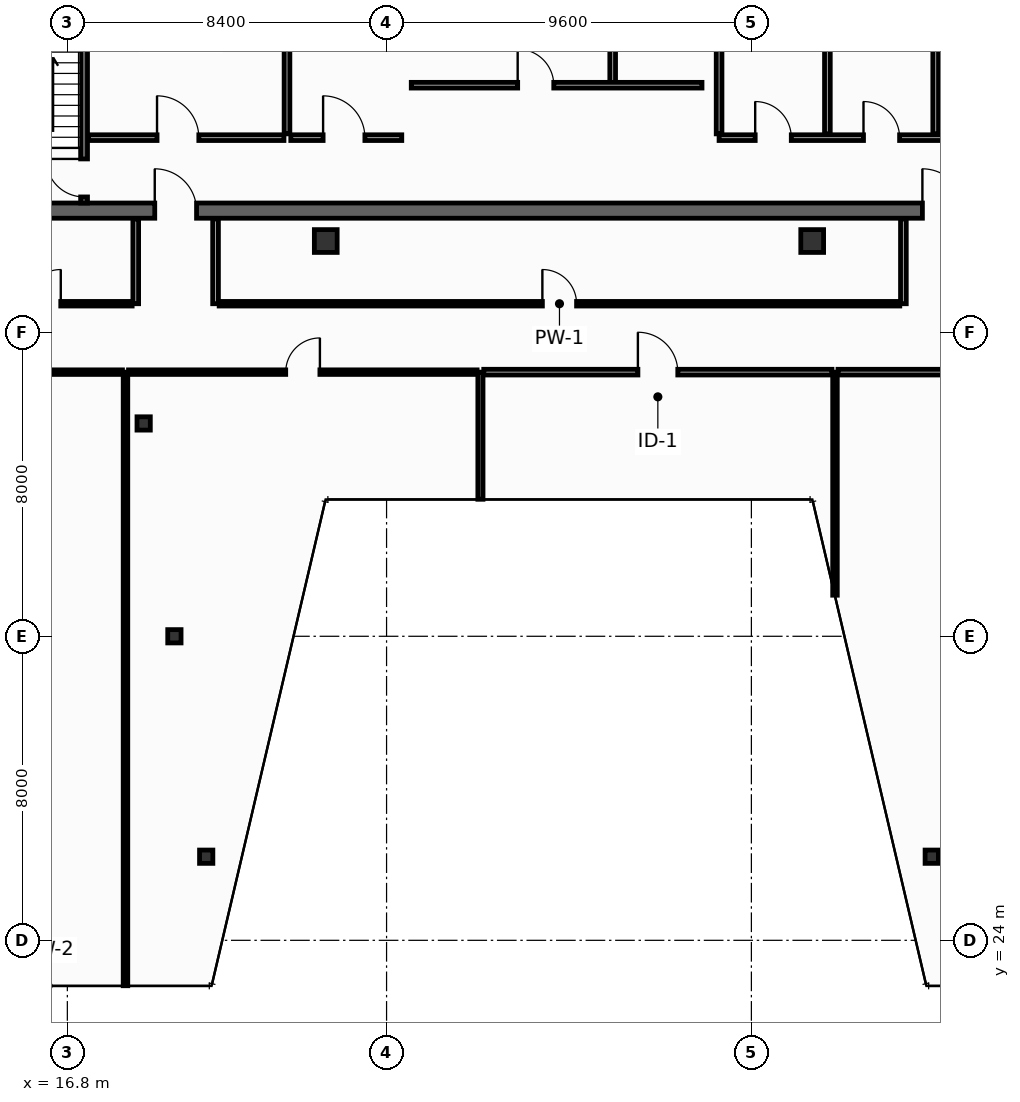
"""IFC4 building model, lengths in metres.
Left out: names, types, materials, properties, quantities, classifications, styles, units other than length and angle.
Written with IfcOpenShell. Run it as: python <this file> out.ifc"""

import sys

from ifc_helpers import new_model, si_unit, direction, frame, frame_2d, origin, origin_2d, place, context, subcontext, project, spatial, rectangle, hollow_rectangle, extrude, element, fill, save


model = new_model("IFC4")
c1 = context("Model", 3, precision=1e-05, world=origin(), true_north=direction((0.0, 1.0)))
c2 = subcontext(c1, "Body", "Model", "MODEL_VIEW")
j1 = project(units=[si_unit("LENGTHUNIT", "METRE"), si_unit("PLANEANGLEUNIT", "RADIAN")], contexts=[c1])
p1 = place(None, origin())
s1 = spatial("IfcSite", under=j1, at=p1, CompositionType="ELEMENT")
p2 = place(p1, origin())
s2 = spatial("IfcBuilding", under=s1, at=p2, CompositionType="ELEMENT")
p3 = place(p2, frame((0.0, 0.0, 268.6)))
s3 = spatial("IfcBuildingStorey", under=s2, at=p3, CompositionType="ELEMENT", Elevation=268.6)
p4 = place(p3, frame((13.7, 43.2, 0.0), z_axis=(0.0, 0.0, 1.0), x_axis=(1.0, 0.0, 0.0)))
e1 = element("IfcWall", 1, at=p4, inside=s3, PredefinedType="SHEAR", context=c2, shape_type="SweptSolid", body=[
    extrude(rectangle(XDim=32.5, YDim=0.4, at=frame_2d((16.25, 0.0))), origin(), (0.0, 0.0, 1.0), 3.55),
])
p5 = place(p4, frame((5.4, 0.0, 0.0)))
e2 = element("IfcOpeningElement", 2, at=p5, cuts=e1, PredefinedType="OPENING", context=c2, shape_type="SweptSolid", body=[
    extrude(rectangle(XDim=1.1, YDim=2.15, at=frame_2d((0.55, 1.075))), frame((0.0, 0.21, 0.0), z_axis=(0.0, -1.0, 0.0), x_axis=(1.0, 0.0, 0.0)), (0.0, 0.0, 1.0), 0.42),
])
p6 = place(p4, frame((25.6, 0.0, 0.0)))
e3 = element("IfcOpeningElement", 3, at=p6, cuts=e1, PredefinedType="OPENING", context=c2, shape_type="SweptSolid", body=[
    extrude(rectangle(XDim=1.1, YDim=2.15, at=frame_2d((0.55, 1.075))), frame((0.0, 0.21, 0.0), z_axis=(0.0, -1.0, 0.0), x_axis=(1.0, 0.0, 0.0)), (0.0, 0.0, 1.0), 0.42),
])
for number, where, z_axis, x_axis in (
    (4, (23.6, 42.4, 0.0), (0.0, 0.0, 1.0), (1.0, 0.0, 0.0)),
    (5, (36.4, 42.4, 0.0), (0.0, 0.0, 1.0), (1.0, 0.0, 0.0)),
):
    element("IfcColumn", number, at=place(p3, frame(where, z_axis=z_axis, x_axis=x_axis)), inside=s3, PredefinedType="COLUMN", context=c2, shape_type="SweptSolid", body=[
        extrude(hollow_rectangle(XDim=0.6, YDim=0.6, WallThickness=0.028, at=origin_2d()), origin(), (0.0, 0.0, 1.0), 3.8),
    ])
for number, where, z_axis, x_axis in (
    (6, (20.454, 26.2, 0.0), (0.0, 0.0, 1.0), (1.0, 0.0, 0.0)),
    (7, (39.546, 26.2, 0.0), (0.0, 0.0, 1.0), (1.0, 0.0, 0.0)),
    (8, (19.617, 32.0, 0.0), (0.0, 0.0, 1.0), (1.0, 0.0, 0.0)),
    (9, (18.808, 37.6, 0.0), (0.0, 0.0, 1.0), (1.0, 0.0, 0.0)),
):
    element("IfcColumn", number, at=place(p3, frame(where, z_axis=z_axis, x_axis=x_axis)), inside=s3, PredefinedType="COLUMN", context=c2, shape_type="SweptSolid", body=[
        extrude(hollow_rectangle(XDim=0.35, YDim=0.35, WallThickness=0.016, at=origin_2d()), origin(), (0.0, 0.0, 1.0), 3.8),
    ])
p7 = place(p3, frame((17.24, 43.4, 0.0), z_axis=(0.0, 0.0, 1.0), x_axis=(0.0, 1.0, 0.0)))
e10 = element("IfcWall", 10, at=p7, inside=s3, PredefinedType="SHEAR", context=c2, shape_type="SweptSolid", body=[
    extrude(rectangle(XDim=10.4, YDim=0.18, at=frame_2d((5.2, 0.0))), origin(), (0.0, 0.0, 1.0), 3.55),
])
p8 = place(p7, frame((0.16, 0.0, 0.0)))
e11 = element("IfcOpeningElement", 11, at=p8, cuts=e10, PredefinedType="OPENING", context=c2, shape_type="SweptSolid", body=[
    extrude(rectangle(XDim=1.0, YDim=2.15, at=frame_2d((0.5, 1.075))), frame((0.0, 0.1, 0.0), z_axis=(0.0, -1.0, 0.0), x_axis=(1.0, 0.0, 0.0)), (0.0, 0.0, 1.0), 0.2),
])
p9 = place(p3, frame((17.36, 45.12, 0.0), z_axis=(0.0, 0.0, 1.0), x_axis=(1.0, 0.0, 0.0)))
e12 = element("IfcWall", 12, at=p9, inside=s3, PredefinedType="PARTITIONING", context=c2, shape_type="SweptSolid", body=[
    extrude(rectangle(XDim=5.14, YDim=0.15, at=frame_2d((2.57, 0.0))), origin(), (0.0, 0.0, 1.0), 3.55),
])
p10 = place(p9, frame((1.8, 0.0, 0.0)))
e13 = element("IfcOpeningElement", 13, at=p10, cuts=e12, PredefinedType="OPENING", context=c2, shape_type="SweptSolid", body=[
    extrude(rectangle(XDim=1.1, YDim=2.15, at=frame_2d((0.55, 1.075))), frame((0.0, 0.085, 0.0), z_axis=(0.0, -1.0, 0.0), x_axis=(1.0, 0.0, 0.0)), (0.0, 0.0, 1.0), 0.17),
])
p11 = place(p3, frame((22.58, 50.55, 0.0), z_axis=(0.0, 0.0, 1.0), x_axis=(0.0, -1.0, 0.0)))
e14 = element("IfcWall", 14, at=p11, inside=s3, PredefinedType="PARTITIONING", context=c2, shape_type="SweptSolid", body=[
    extrude(rectangle(XDim=5.33, YDim=0.15, at=frame_2d((2.665, 0.0))), origin(), (0.0, 0.0, 1.0), 3.55),
])
p12 = place(p11, frame((1.8, 0.0, 0.0)))
e15 = element("IfcOpeningElement", 15, at=p12, cuts=e14, PredefinedType="OPENING", context=c2, shape_type="SweptSolid", body=[
    extrude(rectangle(XDim=1.1, YDim=2.15, at=frame_2d((0.55, 1.075))), frame((0.0, 0.085, 0.0), z_axis=(0.0, -1.0, 0.0), x_axis=(1.0, 0.0, 0.0)), (0.0, 0.0, 1.0), 0.17),
])
p13 = place(p3, frame((22.68, 45.12, 0.0), z_axis=(0.0, 0.0, 1.0), x_axis=(1.0, 0.0, 0.0)))
e16 = element("IfcWall", 16, at=p13, inside=s3, PredefinedType="PARTITIONING", context=c2, shape_type="SweptSolid", body=[
    extrude(rectangle(XDim=2.92, YDim=0.15, at=frame_2d((1.46, 0.0))), origin(), (0.0, 0.0, 1.0), 3.55),
])
p14 = place(p13, frame((0.85, 0.0, 0.0)))
e17 = element("IfcOpeningElement", 17, at=p14, cuts=e16, PredefinedType="OPENING", context=c2, shape_type="SweptSolid", body=[
    extrude(rectangle(XDim=1.1, YDim=2.15, at=frame_2d((0.55, 1.075))), frame((0.0, 0.085, 0.0), z_axis=(0.0, -1.0, 0.0), x_axis=(1.0, 0.0, 0.0)), (0.0, 0.0, 1.0), 0.17),
])
p15 = place(p3, frame((31.15, 46.5, 0.0), z_axis=(0.0, 0.0, 1.0), x_axis=(0.0, 1.0, 0.0)))
e18 = element("IfcWall", 18, at=p15, inside=s3, PredefinedType="PARTITIONING", context=c2, shape_type="SweptSolid", body=[
    extrude(rectangle(XDim=4.35, YDim=0.15, at=frame_2d((2.175, 0.0))), origin(), (0.0, 0.0, 1.0), 3.55),
])
p16 = place(p15, frame((1.5, 0.0, 0.0)))
e19 = element("IfcOpeningElement", 19, at=p16, cuts=e18, PredefinedType="OPENING", context=c2, shape_type="SweptSolid", body=[
    extrude(rectangle(XDim=1.05, YDim=2.15, at=frame_2d((0.525, 1.075))), frame((0.0, 0.085, 0.0), z_axis=(0.0, -1.0, 0.0), x_axis=(1.0, 0.0, 0.0)), (0.0, 0.0, 1.0), 0.17),
])
p17 = place(p3, frame((33.95, 45.12, 0.0), z_axis=(0.0, 0.0, 1.0), x_axis=(1.0, 0.0, 0.0)))
e20 = element("IfcWall", 20, at=p17, inside=s3, PredefinedType="PARTITIONING", context=c2, shape_type="SweptSolid", body=[
    extrude(rectangle(XDim=8.55, YDim=0.15, at=frame_2d((4.275, 0.0))), origin(), (0.0, 0.0, 1.0), 3.55),
])
p18 = place(p17, frame((0.95, 0.0, 0.0)))
e21 = element("IfcOpeningElement", 21, at=p18, cuts=e20, PredefinedType="OPENING", context=c2, shape_type="SweptSolid", body=[
    extrude(rectangle(XDim=0.95, YDim=2.15, at=frame_2d((0.475, 1.075))), frame((0.0, 0.085, 0.0), z_axis=(0.0, -1.0, 0.0), x_axis=(1.0, 0.0, 0.0)), (0.0, 0.0, 1.0), 0.17),
])
p19 = place(p17, frame((3.8, 0.0, 0.0)))
e22 = element("IfcOpeningElement", 22, at=p19, cuts=e20, PredefinedType="OPENING", context=c2, shape_type="SweptSolid", body=[
    extrude(rectangle(XDim=0.95, YDim=2.15, at=frame_2d((0.475, 1.075))), frame((0.0, 0.085, 0.0), z_axis=(0.0, -1.0, 0.0), x_axis=(1.0, 0.0, 0.0)), (0.0, 0.0, 1.0), 0.17),
])
p20 = place(p17, frame((6.65, 0.0, 0.0)))
e23 = element("IfcOpeningElement", 23, at=p20, cuts=e20, PredefinedType="OPENING", context=c2, shape_type="SweptSolid", body=[
    extrude(rectangle(XDim=0.95, YDim=2.15, at=frame_2d((0.475, 1.075))), frame((0.0, 0.085, 0.0), z_axis=(0.0, -1.0, 0.0), x_axis=(1.0, 0.0, 0.0)), (0.0, 0.0, 1.0), 0.17),
])
for number, where, z_axis, x_axis in (
    (24, (33.95, 45.22, 0.0), (0.0, 0.0, 1.0), (0.0, 1.0, 0.0)),
    (25, (36.8, 45.22, 0.0), (0.0, 0.0, 1.0), (0.0, 1.0, 0.0)),
    (26, (39.65, 45.22, 0.0), (0.0, 0.0, 1.0), (0.0, 1.0, 0.0)),
):
    element("IfcWall", number, at=place(p3, frame(where, z_axis=z_axis, x_axis=x_axis)), inside=s3, PredefinedType="PARTITIONING", context=c2, shape_type="SweptSolid", body=[
        extrude(rectangle(XDim=2.33, YDim=0.15, at=frame_2d((1.165, 0.0))), origin(), (0.0, 0.0, 1.0), 3.55),
    ])
p21 = place(p3, frame((25.85, 46.5, 0.0), z_axis=(0.0, 0.0, 1.0), x_axis=(1.0, 0.0, 0.0)))
e27 = element("IfcWall", 27, at=p21, inside=s3, PredefinedType="PARTITIONING", context=c2, shape_type="SweptSolid", body=[
    extrude(rectangle(XDim=7.65, YDim=0.15, at=frame_2d((3.825, 0.0))), origin(), (0.0, 0.0, 1.0), 3.55),
])
p22 = place(p21, frame((2.8, 0.0, 0.0)))
e28 = element("IfcOpeningElement", 28, at=p22, cuts=e27, PredefinedType="OPENING", context=c2, shape_type="SweptSolid", body=[
    extrude(rectangle(XDim=0.95, YDim=2.15, at=frame_2d((0.475, 1.075))), frame((0.0, 0.085, 0.0), z_axis=(0.0, -1.0, 0.0), x_axis=(1.0, 0.0, 0.0)), (0.0, 0.0, 1.0), 0.17),
])
for number, where, z_axis, x_axis in (
    (29, (18.6, 40.75, 0.0), (0.0, 0.0, 1.0), (0.0, 1.0, 0.0)),
    (30, (20.7, 40.75, 0.0), (0.0, 0.0, 1.0), (0.0, 1.0, 0.0)),
    (31, (38.8, 40.75, 0.0), (0.0, 0.0, 1.0), (0.0, 1.0, 0.0)),
):
    element("IfcWall", number, at=place(p3, frame(where, z_axis=z_axis, x_axis=x_axis)), inside=s3, PredefinedType="PARTITIONING", context=c2, shape_type="SweptSolid", body=[
        extrude(rectangle(XDim=2.23, YDim=0.15, at=frame_2d((1.115, 0.0))), origin(), (0.0, 0.0, 1.0), 3.55),
    ])
p23 = place(p3, frame((13.85, 40.75, 0.0), z_axis=(0.0, 0.0, 1.0), x_axis=(1.0, 0.0, 0.0)))
e32 = element("IfcWall", 32, at=p23, inside=s3, PredefinedType="PARTITIONING", context=c2, shape_type="SweptSolid", body=[
    extrude(rectangle(XDim=4.655, YDim=0.12, at=frame_2d((2.327, 0.0))), origin(), (0.0, 0.0, 1.0), 3.55),
])
p24 = place(p23, frame((1.877, 0.0, 0.0)))
e33 = element("IfcOpeningElement", 33, at=p24, cuts=e32, PredefinedType="OPENING", context=c2, shape_type="SweptSolid", body=[
    extrude(rectangle(XDim=0.9, YDim=2.1, at=frame_2d((0.45, 1.05))), frame((0.0, 0.07, 0.0), z_axis=(0.0, -1.0, 0.0), x_axis=(1.0, 0.0, 0.0)), (0.0, 0.0, 1.0), 0.14),
])
p25 = place(p3, frame((20.795, 40.75, 0.0), z_axis=(0.0, 0.0, 1.0), x_axis=(1.0, 0.0, 0.0)))
e34 = element("IfcWall", 34, at=p25, inside=s3, PredefinedType="PARTITIONING", context=c2, shape_type="SweptSolid", body=[
    extrude(rectangle(XDim=17.91, YDim=0.12, at=frame_2d((8.955, 0.0))), origin(), (0.0, 0.0, 1.0), 2.947),
])
p26 = place(p25, frame((8.505, 0.0, 0.0)))
e35 = element("IfcOpeningElement", 35, at=p26, cuts=e34, PredefinedType="OPENING", context=c2, shape_type="SweptSolid", body=[
    extrude(rectangle(XDim=0.9, YDim=2.1, at=frame_2d((0.45, 1.05))), frame((0.0, 0.07, 0.0), z_axis=(0.0, -1.0, 0.0), x_axis=(1.0, 0.0, 0.0)), (0.0, 0.0, 1.0), 0.14),
])
p27 = place(p3, frame((18.33, 22.805, 0.0), z_axis=(0.0, 0.0, 1.0), x_axis=(0.0, 1.0, 0.0)))
e36 = element("IfcWall", 36, at=p27, inside=s3, PredefinedType="PARTITIONING", context=c2, shape_type="SweptSolid", body=[
    extrude(rectangle(XDim=16.145, YDim=0.12, at=frame_2d((8.073, 0.0))), origin(), (0.0, 0.0, 1.0), 2.947),
])
p28 = place(p3, frame((27.67, 35.605, 0.0), z_axis=(0.0, 0.0, 1.0), x_axis=(0.0, 1.0, 0.0)))
e37 = element("IfcWall", 37, at=p28, inside=s3, PredefinedType="PARTITIONING", context=c2, shape_type="SweptSolid", body=[
    extrude(rectangle(XDim=3.345, YDim=0.135, at=frame_2d((1.672, 0.0))), origin(), (0.0, 0.0, 1.0), 3.55),
])
p29 = place(p3, frame((37.0, 33.081, 0.0), z_axis=(0.0, 0.0, 1.0), x_axis=(0.0, 1.0, 0.0)))
e38 = element("IfcWall", 38, at=p29, inside=s3, PredefinedType="PARTITIONING", context=c2, shape_type="SweptSolid", body=[
    extrude(rectangle(XDim=5.869, YDim=0.12, at=frame_2d((2.935, 0.0))), origin(), (0.0, 0.0, 1.0), 3.55),
])
p30 = place(p3, frame((6.483, 38.95, 0.0), z_axis=(0.0, 0.0, 1.0), x_axis=(1.0, 0.0, 0.0)))
e39 = element("IfcWall", 39, at=p30, inside=s3, PredefinedType="PARTITIONING", context=c2, shape_type="SweptSolid", body=[
    extrude(rectangle(XDim=11.767, YDim=0.12, at=frame_2d((5.883, 0.0))), origin(), (0.0, 0.0, 1.0), 3.085),
])
p31 = place(p30, frame((5.433, 0.0, 0.0)))
e40 = element("IfcOpeningElement", 40, at=p31, cuts=e39, PredefinedType="OPENING", context=c2, shape_type="SweptSolid", body=[
    extrude(rectangle(XDim=0.9, YDim=2.1, at=frame_2d((0.45, 1.05))), frame((0.0, 0.07, 0.0), z_axis=(0.0, -1.0, 0.0), x_axis=(1.0, 0.0, 0.0)), (0.0, 0.0, 1.0), 0.14),
])
p32 = place(p3, frame((18.41, 38.95, 0.0), z_axis=(0.0, 0.0, 1.0), x_axis=(1.0, 0.0, 0.0)))
e41 = element("IfcWall", 41, at=p32, inside=s3, PredefinedType="PARTITIONING", context=c2, shape_type="SweptSolid", body=[
    extrude(rectangle(XDim=9.173, YDim=0.12, at=frame_2d((4.586, 0.0))), origin(), (0.0, 0.0, 1.0), 2.947),
])
p33 = place(p32, frame((4.136, 0.0, 0.0)))
e42 = element("IfcOpeningElement", 42, at=p33, cuts=e41, PredefinedType="OPENING", context=c2, shape_type="SweptSolid", body=[
    extrude(rectangle(XDim=0.9, YDim=2.1, at=frame_2d((0.45, 1.05))), frame((0.0, 0.07, 0.0), z_axis=(0.0, -1.0, 0.0), x_axis=(1.0, 0.0, 0.0)), (0.0, 0.0, 1.0), 0.14),
])
p34 = place(p3, frame((27.758, 38.95, 0.0), z_axis=(0.0, 0.0, 1.0), x_axis=(1.0, 0.0, 0.0)))
e43 = element("IfcWall", 43, at=p34, inside=s3, PredefinedType="PARTITIONING", context=c2, shape_type="SweptSolid", body=[
    extrude(rectangle(XDim=9.162, YDim=0.15, at=frame_2d((4.581, 0.0))), origin(), (0.0, 0.0, 1.0), 3.55),
])
p35 = place(p34, frame((4.056, 0.0, 0.0)))
e44 = element("IfcOpeningElement", 44, at=p35, cuts=e43, PredefinedType="OPENING", context=c2, shape_type="SweptSolid", body=[
    extrude(rectangle(XDim=1.05, YDim=2.15, at=frame_2d((0.525, 1.075))), frame((0.0, 0.085, 0.0), z_axis=(0.0, -1.0, 0.0), x_axis=(1.0, 0.0, 0.0)), (0.0, 0.0, 1.0), 0.17),
])
p36 = place(p3, frame((37.08, 38.95, 0.0), z_axis=(0.0, 0.0, 1.0), x_axis=(1.0, 0.0, 0.0)))
e45 = element("IfcWall", 45, at=p36, inside=s3, PredefinedType="PARTITIONING", context=c2, shape_type="SweptSolid", body=[
    extrude(rectangle(XDim=9.172, YDim=0.15, at=frame_2d((4.586, 0.0))), origin(), (0.0, 0.0, 1.0), 2.947),
])
p37 = place(p36, frame((4.501, 0.0, 0.0)))
e46 = element("IfcOpeningElement", 46, at=p37, cuts=e45, PredefinedType="OPENING", context=c2, shape_type="SweptSolid", body=[
    extrude(rectangle(XDim=1.05, YDim=2.15, at=frame_2d((0.525, 1.075))), frame((0.0, 0.085, 0.0), z_axis=(0.0, -1.0, 0.0), x_axis=(1.0, 0.0, 0.0)), (0.0, 0.0, 1.0), 0.17),
])
p38 = place(p8, origin())
e47 = element("IfcDoor", 47, at=p38, inside=s3, OperationType="SINGLE_SWING_RIGHT", PredefinedType="DOOR", context=c2, shape_type="SweptSolid", body=[
    extrude(rectangle(XDim=1.0, YDim=2.15, at=frame_2d((0.5, 1.075))), frame((0.0, 0.025, 0.0), z_axis=(0.0, -1.0, 0.0), x_axis=(1.0, 0.0, 0.0)), (0.0, 0.0, 1.0), 0.05),
])
fill(e11, e47)
p39 = place(p10, origin())
e48 = element("IfcDoor", 48, at=p39, inside=s3, OperationType="SINGLE_SWING_LEFT", PredefinedType="DOOR", context=c2, shape_type="SweptSolid", body=[
    extrude(rectangle(XDim=1.1, YDim=2.15, at=frame_2d((0.55, 1.075))), frame((0.0, 0.025, 0.0), z_axis=(0.0, -1.0, 0.0), x_axis=(1.0, 0.0, 0.0)), (0.0, 0.0, 1.0), 0.05),
])
fill(e13, e48)
p40 = place(p14, origin())
e49 = element("IfcDoor", 49, at=p40, inside=s3, OperationType="SINGLE_SWING_LEFT", PredefinedType="DOOR", context=c2, shape_type="SweptSolid", body=[
    extrude(rectangle(XDim=1.1, YDim=2.15, at=frame_2d((0.55, 1.075))), frame((0.0, 0.025, 0.0), z_axis=(0.0, -1.0, 0.0), x_axis=(1.0, 0.0, 0.0)), (0.0, 0.0, 1.0), 0.05),
])
fill(e17, e49)
p41 = place(p5, origin())
e50 = element("IfcDoor", 50, at=p41, inside=s3, OperationType="SINGLE_SWING_LEFT", PredefinedType="DOOR", context=c2, shape_type="SweptSolid", body=[
    extrude(rectangle(XDim=1.1, YDim=2.15, at=frame_2d((0.55, 1.075))), frame((0.0, 0.025, 0.0), z_axis=(0.0, -1.0, 0.0), x_axis=(1.0, 0.0, 0.0)), (0.0, 0.0, 1.0), 0.05),
])
fill(e2, e50)
p42 = place(p6, origin())
e51 = element("IfcDoor", 51, at=p42, inside=s3, OperationType="SINGLE_SWING_LEFT", PredefinedType="DOOR", context=c2, shape_type="SweptSolid", body=[
    extrude(rectangle(XDim=1.1, YDim=2.15, at=frame_2d((0.55, 1.075))), frame((0.0, 0.025, 0.0), z_axis=(0.0, -1.0, 0.0), x_axis=(1.0, 0.0, 0.0)), (0.0, 0.0, 1.0), 0.05),
])
fill(e3, e51)
p43 = place(p18, origin())
e52 = element("IfcDoor", 52, at=p43, inside=s3, OperationType="SINGLE_SWING_LEFT", PredefinedType="DOOR", context=c2, shape_type="SweptSolid", body=[
    extrude(rectangle(XDim=0.95, YDim=2.15, at=frame_2d((0.475, 1.075))), frame((0.0, 0.025, 0.0), z_axis=(0.0, -1.0, 0.0), x_axis=(1.0, 0.0, 0.0)), (0.0, 0.0, 1.0), 0.05),
])
fill(e21, e52)
p44 = place(p19, origin())
e53 = element("IfcDoor", 53, at=p44, inside=s3, OperationType="SINGLE_SWING_LEFT", PredefinedType="DOOR", context=c2, shape_type="SweptSolid", body=[
    extrude(rectangle(XDim=0.95, YDim=2.15, at=frame_2d((0.475, 1.075))), frame((0.0, 0.025, 0.0), z_axis=(0.0, -1.0, 0.0), x_axis=(1.0, 0.0, 0.0)), (0.0, 0.0, 1.0), 0.05),
])
fill(e22, e53)
p45 = place(p22, origin())
e54 = element("IfcDoor", 54, at=p45, inside=s3, OperationType="SINGLE_SWING_LEFT", PredefinedType="DOOR", context=c2, shape_type="SweptSolid", body=[
    extrude(rectangle(XDim=0.95, YDim=2.15, at=frame_2d((0.475, 1.075))), frame((0.0, 0.025, 0.0), z_axis=(0.0, -1.0, 0.0), x_axis=(1.0, 0.0, 0.0)), (0.0, 0.0, 1.0), 0.05),
])
fill(e28, e54)
p46 = place(p24, origin())
e55 = element("IfcDoor", 55, at=p46, inside=s3, OperationType="SINGLE_SWING_RIGHT", PredefinedType="DOOR", context=c2, shape_type="SweptSolid", body=[
    extrude(rectangle(XDim=0.9, YDim=2.1, at=frame_2d((0.45, 1.05))), frame((0.0, 0.025, 0.0), z_axis=(0.0, -1.0, 0.0), x_axis=(1.0, 0.0, 0.0)), (0.0, 0.0, 1.0), 0.05),
])
fill(e33, e55)
p47 = place(p26, origin())
e56 = element("IfcDoor", 56, at=p47, inside=s3, OperationType="SINGLE_SWING_LEFT", PredefinedType="DOOR", context=c2, shape_type="SweptSolid", body=[
    extrude(rectangle(XDim=0.9, YDim=2.1, at=frame_2d((0.45, 1.05))), frame((0.0, 0.025, 0.0), z_axis=(0.0, -1.0, 0.0), x_axis=(1.0, 0.0, 0.0)), (0.0, 0.0, 1.0), 0.05),
])
fill(e35, e56)
p48 = place(p33, origin())
e57 = element("IfcDoor", 57, at=p48, inside=s3, OperationType="SINGLE_SWING_RIGHT", PredefinedType="DOOR", context=c2, shape_type="SweptSolid", body=[
    extrude(rectangle(XDim=0.9, YDim=2.1, at=frame_2d((0.45, 1.05))), frame((0.0, 0.025, 0.0), z_axis=(0.0, -1.0, 0.0), x_axis=(1.0, 0.0, 0.0)), (0.0, 0.0, 1.0), 0.05),
])
fill(e42, e57)
p49 = place(p35, origin())
e58 = element("IfcDoor", 58, at=p49, inside=s3, OperationType="SINGLE_SWING_LEFT", PredefinedType="DOOR", context=c2, shape_type="SweptSolid", body=[
    extrude(rectangle(XDim=1.05, YDim=2.15, at=frame_2d((0.525, 1.075))), frame((0.0, 0.025, 0.0), z_axis=(0.0, -1.0, 0.0), x_axis=(1.0, 0.0, 0.0)), (0.0, 0.0, 1.0), 0.05),
])
fill(e44, e58)
save(model, sys.argv[1])
